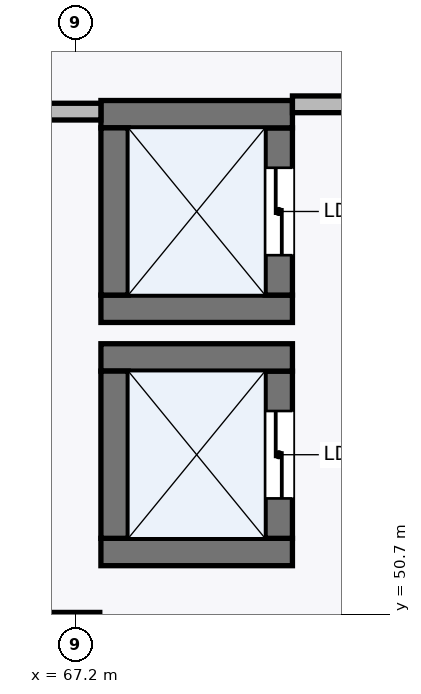
"""IFC4 building model, lengths in metres.
Left out: names, types, materials, properties, quantities, classifications, styles, units other than length and angle.
Written with IfcOpenShell. Run it as: python <this file> out.ifc"""

import sys

from ifc_helpers import new_model, si_unit, direction, frame, frame_2d, origin, origin_2d, place, context, subcontext, project, spatial, rectangle, extrude, element, fill, save


model = new_model("IFC4")
c1 = context("Model", 3, precision=1e-05, world=origin(), true_north=direction((0.0, 1.0)))
c2 = subcontext(c1, "Body", "Model", "MODEL_VIEW")
j1 = project(units=[si_unit("LENGTHUNIT", "METRE"), si_unit("PLANEANGLEUNIT", "RADIAN")], contexts=[c1])
p1 = place(None, origin())
s1 = spatial("IfcSite", under=j1, at=p1, CompositionType="ELEMENT")
p2 = place(p1, origin())
s2 = spatial("IfcBuilding", under=s1, at=p2, CompositionType="ELEMENT")
p3 = place(p2, frame((0.0, 0.0, -5.4)))
s3 = spatial("IfcBuildingStorey", under=s2, at=p3, CompositionType="ELEMENT", Elevation=-5.4)
p4 = place(p3, frame((67.2, 50.4, 0.0), z_axis=(0.0, 0.0, 1.0), x_axis=(1.0, 0.0, 0.0)))
e1 = element("IfcColumn", 1, at=p4, inside=s3, PredefinedType="COLUMN", context=c2, shape_type="SweptSolid", body=[
    extrude(rectangle(XDim=0.65, YDim=0.65, at=origin_2d()), origin(), (0.0, 0.0, 1.0), 5.4),
])
p5 = place(p3, frame((67.54, 51.52, 0.0), z_axis=(0.0, 0.0, 1.0), x_axis=(1.0, 0.0, 0.0)))
e2 = element("IfcWall", 2, at=p5, inside=s3, PredefinedType="SHEAR", context=c2, shape_type="SweptSolid", body=[
    extrude(rectangle(XDim=2.52, YDim=0.36, at=frame_2d((1.26, 0.0))), origin(), (0.0, 0.0, 1.0), 5.145),
])
p6 = place(p3, frame((69.88, 51.7, 0.0), z_axis=(0.0, 0.0, 1.0), x_axis=(0.0, 1.0, 0.0)))
e3 = element("IfcWall", 3, at=p6, inside=s3, PredefinedType="SHEAR", context=c2, shape_type="SweptSolid", body=[
    extrude(rectangle(XDim=2.2, YDim=0.36, at=frame_2d((1.1, 0.0))), origin(), (0.0, 0.0, 1.0), 5.145),
])
p7 = place(p6, frame((0.525, 0.0, 0.0)))
e4 = element("IfcOpeningElement", 4, at=p7, cuts=e3, PredefinedType="OPENING", context=c2, shape_type="SweptSolid", body=[
    extrude(rectangle(XDim=1.15, YDim=2.2, at=frame_2d((0.575, 1.1))), frame((0.0, 0.19, 0.0), z_axis=(0.0, -1.0, 0.0), x_axis=(1.0, 0.0, 0.0)), (0.0, 0.0, 1.0), 0.38),
])
p8 = place(p3, frame((70.06, 54.08, 0.0), z_axis=(0.0, 0.0, 1.0), x_axis=(-1.0, 0.0, 0.0)))
e5 = element("IfcWall", 5, at=p8, inside=s3, PredefinedType="SHEAR", context=c2, shape_type="SweptSolid", body=[
    extrude(rectangle(XDim=2.52, YDim=0.36, at=frame_2d((1.26, 0.0))), origin(), (0.0, 0.0, 1.0), 5.145),
])
p9 = place(p3, frame((67.72, 53.9, 0.0), z_axis=(0.0, 0.0, 1.0), x_axis=(0.0, -1.0, 0.0)))
e6 = element("IfcWall", 6, at=p9, inside=s3, PredefinedType="SHEAR", context=c2, shape_type="SweptSolid", body=[
    extrude(rectangle(XDim=2.2, YDim=0.36, at=frame_2d((1.1, 0.0))), origin(), (0.0, 0.0, 1.0), 5.145),
])
p10 = place(p3, frame((67.54, 54.72, 0.0), z_axis=(0.0, 0.0, 1.0), x_axis=(1.0, 0.0, 0.0)))
e7 = element("IfcWall", 7, at=p10, inside=s3, PredefinedType="SHEAR", context=c2, shape_type="SweptSolid", body=[
    extrude(rectangle(XDim=2.52, YDim=0.36, at=frame_2d((1.26, 0.0))), origin(), (0.0, 0.0, 1.0), 5.145),
])
p11 = place(p3, frame((69.88, 54.9, 0.0), z_axis=(0.0, 0.0, 1.0), x_axis=(0.0, 1.0, 0.0)))
e8 = element("IfcWall", 8, at=p11, inside=s3, PredefinedType="SHEAR", context=c2, shape_type="SweptSolid", body=[
    extrude(rectangle(XDim=2.2, YDim=0.36, at=frame_2d((1.1, 0.0))), origin(), (0.0, 0.0, 1.0), 5.145),
])
p12 = place(p11, frame((0.525, 0.0, 0.0)))
e9 = element("IfcOpeningElement", 9, at=p12, cuts=e8, PredefinedType="OPENING", context=c2, shape_type="SweptSolid", body=[
    extrude(rectangle(XDim=1.15, YDim=2.2, at=frame_2d((0.575, 1.1))), frame((0.0, 0.19, 0.0), z_axis=(0.0, -1.0, 0.0), x_axis=(1.0, 0.0, 0.0)), (0.0, 0.0, 1.0), 0.38),
])
p13 = place(p3, frame((70.06, 57.28, 0.0), z_axis=(0.0, 0.0, 1.0), x_axis=(-1.0, 0.0, 0.0)))
e10 = element("IfcWall", 10, at=p13, inside=s3, PredefinedType="SHEAR", context=c2, shape_type="SweptSolid", body=[
    extrude(rectangle(XDim=2.52, YDim=0.36, at=frame_2d((1.26, 0.0))), origin(), (0.0, 0.0, 1.0), 5.145),
])
p14 = place(p3, frame((67.72, 57.1, 0.0), z_axis=(0.0, 0.0, 1.0), x_axis=(0.0, -1.0, 0.0)))
e11 = element("IfcWall", 11, at=p14, inside=s3, PredefinedType="SHEAR", context=c2, shape_type="SweptSolid", body=[
    extrude(rectangle(XDim=2.2, YDim=0.36, at=frame_2d((1.1, 0.0))), origin(), (0.0, 0.0, 1.0), 5.145),
])
p15 = place(p3, frame((59.16, 57.314, 0.0), z_axis=(0.0, 0.0, 1.0), x_axis=(1.0, 0.0, 0.0)))
e12 = element("IfcWall", 12, at=p15, inside=s3, PredefinedType="PARTITIONING", context=c2, shape_type="SweptSolid", body=[
    extrude(rectangle(XDim=8.38, YDim=0.22, at=frame_2d((4.19, 0.0))), origin(), (0.0, 0.0, 1.0), 5.145),
])
p16 = place(p15, frame((3.19, 0.0, 0.0)))
e13 = element("IfcOpeningElement", 13, at=p16, cuts=e12, PredefinedType="OPENING", context=c2, shape_type="SweptSolid", body=[
    extrude(rectangle(XDim=2.0, YDim=2.2, at=frame_2d((1.0, 1.1))), frame((0.0, 0.12, 0.0), z_axis=(0.0, -1.0, 0.0), x_axis=(1.0, 0.0, 0.0)), (0.0, 0.0, 1.0), 0.24),
])
p17 = place(p3, frame((70.06, 57.41, 0.0), z_axis=(0.0, 0.0, 1.0), x_axis=(1.0, 0.0, 0.0)))
e14 = element("IfcWall", 14, at=p17, inside=s3, PredefinedType="PARTITIONING", context=c2, shape_type="SweptSolid", body=[
    extrude(rectangle(XDim=0.93, YDim=0.22, at=frame_2d((0.465, 0.0))), origin(), (0.0, 0.0, 1.0), 5.145),
])
p18 = place(p7, frame((1.15, 0.0, 0.0), z_axis=(0.0, 0.0, 1.0), x_axis=(-1.0, 0.0, 0.0)))
e15 = element("IfcDoor", 15, at=p18, inside=s3, OperationType="DOUBLE_DOOR_SLIDING", PredefinedType="DOOR", context=c2, shape_type="SweptSolid", body=[
    extrude(rectangle(XDim=1.15, YDim=2.2, at=frame_2d((0.575, 1.1))), frame((0.0, 0.025, 0.0), z_axis=(0.0, -1.0, 0.0), x_axis=(1.0, 0.0, 0.0)), (0.0, 0.0, 1.0), 0.05),
])
fill(e4, e15)
p19 = place(p12, frame((1.15, 0.0, 0.0), z_axis=(0.0, 0.0, 1.0), x_axis=(-1.0, 0.0, 0.0)))
e16 = element("IfcDoor", 16, at=p19, inside=s3, OperationType="DOUBLE_DOOR_SLIDING", PredefinedType="DOOR", context=c2, shape_type="SweptSolid", body=[
    extrude(rectangle(XDim=1.15, YDim=2.2, at=frame_2d((0.575, 1.1))), frame((0.0, 0.025, 0.0), z_axis=(0.0, -1.0, 0.0), x_axis=(1.0, 0.0, 0.0)), (0.0, 0.0, 1.0), 0.05),
])
fill(e9, e16)
save(model, sys.argv[1])
